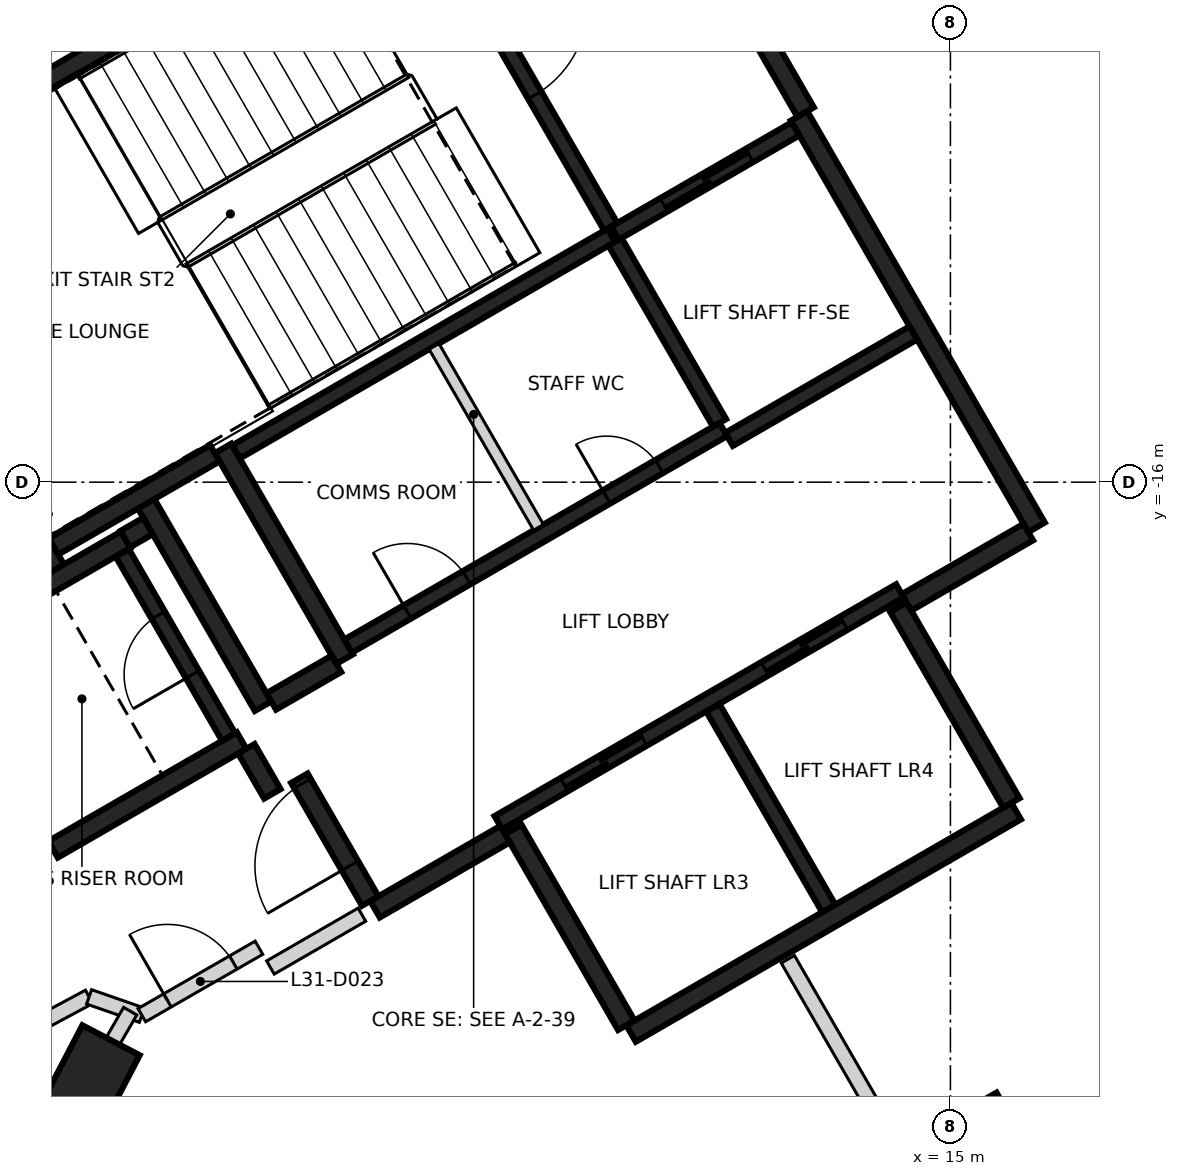
"""IFC4 building model, lengths in metres.
Left out: names, types, materials, properties, quantities, classifications, styles, units other than length and angle.
Written with IfcOpenShell. Run it as: python <this file> out.ifc"""

import sys

from ifc_helpers import new_model, si_unit, direction, frame, frame_2d, origin, origin_2d, place, context, subcontext, project, spatial, rectangle, extrude, element, fill, save


model = new_model("IFC4")
c1 = context("Model", 3, precision=1e-05, world=origin(), true_north=direction((0.0, 1.0)))
c2 = subcontext(c1, "Body", "Model", "MODEL_VIEW")
j1 = project(units=[si_unit("LENGTHUNIT", "METRE"), si_unit("PLANEANGLEUNIT", "RADIAN")], contexts=[c1])
p1 = place(None, origin())
s1 = spatial("IfcSite", under=j1, at=p1, CompositionType="ELEMENT")
p2 = place(p1, origin())
s2 = spatial("IfcBuilding", under=s1, at=p2, CompositionType="ELEMENT")
p3 = place(p2, frame((0.0, 0.0, 128.8)))
s3 = spatial("IfcBuildingStorey", under=s2, at=p3, CompositionType="ELEMENT", Elevation=128.8)
p4 = place(p3, frame((3.667, -23.896, -0.4), z_axis=(0.0, 0.0, 1.0), x_axis=(0.463006774365, 0.886354740999, 0.0)))
e1 = element("IfcColumn", 1, at=p4, inside=s3, PredefinedType="COLUMN", context=c2, shape_type="SweptSolid", body=[
    extrude(rectangle(XDim=1.25, YDim=0.85, at=origin_2d()), origin(), (0.0, 0.0, 1.0), 3.6),
])
p5 = place(p3, frame((15.207, -26.34, -0.4), z_axis=(0.0, 0.0, 1.0), x_axis=(-0.5, 0.866025403784, 0.0)))
e2 = element("IfcColumn", 2, at=p5, inside=s3, PredefinedType="COLUMN", context=c2, shape_type="SweptSolid", body=[
    extrude(rectangle(XDim=3.6, YDim=3.0, at=origin_2d()), origin(), (0.0, 0.0, 1.0), 3.6),
])
p6 = place(p3, frame((0.417, -12.273, 0.0), z_axis=(0.0, 0.0, 1.0), x_axis=(0.866021906294, 0.500006057782, 0.0)))
e3 = element("IfcWall", 3, at=p6, inside=s3, PredefinedType="SHEAR", context=c2, shape_type="SweptSolid", body=[
    extrude(rectangle(XDim=11.55, YDim=0.25, at=frame_2d((5.775, 0.0))), origin(), (0.0, 0.0, 1.0), 3.2),
])
p7 = place(p6, frame((10.025, 0.0, 0.0)))
e4 = element("IfcOpeningElement", 4, at=p7, cuts=e3, PredefinedType="OPENING", context=c2, shape_type="SweptSolid", body=[
    extrude(rectangle(XDim=1.2, YDim=2.1, at=frame_2d((0.6, 1.05))), frame((0.0, 0.135, 0.0), z_axis=(0.0, -1.0, 0.0), x_axis=(1.0, 0.0, 0.0)), (0.0, 0.0, 1.0), 0.27),
])
p8 = place(p6, frame((8.725, 0.0, 0.0)))
e5 = element("IfcOpeningElement", 5, at=p8, cuts=e3, PredefinedType="OPENING", context=c2, shape_type="SweptSolid", body=[
    extrude(rectangle(XDim=1.2, YDim=2.1, at=frame_2d((0.6, 1.05))), frame((0.0, 0.135, 0.0), z_axis=(0.0, -1.0, 0.0), x_axis=(1.0, 0.0, 0.0)), (0.0, 0.0, 1.0), 0.27),
])
p9 = place(p3, frame((13.008, -11.181, 0.0), z_axis=(0.0, 0.0, 1.0), x_axis=(0.500004234368, -0.866022959057, 0.0)))
e6 = element("IfcWall", 6, at=p9, inside=s3, PredefinedType="SHEAR", context=c2, shape_type="SweptSolid", body=[
    extrude(rectangle(XDim=6.25, YDim=0.25, at=frame_2d((3.125, 0.0))), origin(), (0.0, 0.0, 1.0), 3.2),
])
p10 = place(p3, frame((15.865, -20.328, 0.0), z_axis=(0.0, 0.0, 1.0), x_axis=(-0.86602852612, -0.499994591916, 0.0)))
e7 = element("IfcWall", 7, at=p10, inside=s3, PredefinedType="SHEAR", context=c2, shape_type="SweptSolid", body=[
    extrude(rectangle(XDim=5.85, YDim=0.25, at=frame_2d((2.925, 0.0))), origin(), (0.0, 0.0, 1.0), 3.2),
])
p11 = place(p3, frame((3.235, -17.153, 0.0), z_axis=(0.0, 0.0, 1.0), x_axis=(-0.500008851346, 0.866020293397, 0.0)))
e8 = element("IfcWall", 8, at=p11, inside=s3, PredefinedType="SHEAR", context=c2, shape_type="SweptSolid", body=[
    extrude(rectangle(XDim=5.51, YDim=0.25, at=frame_2d((2.755, 0.0))), origin(), (0.0, 0.0, 1.0), 3.2),
])
p12 = place(p3, frame((10.483, -6.606, 0.0), z_axis=(0.0, 0.0, 1.0), x_axis=(0.49999885962, -0.866026062182, 0.0)))
e9 = element("IfcWall", 9, at=p12, inside=s3, PredefinedType="SHEAR", context=c2, shape_type="SweptSolid", body=[
    extrude(rectangle(XDim=5.225, YDim=0.25, at=frame_2d((2.612, 0.0))), origin(), (0.0, 0.0, 1.0), 3.2),
])
p13 = place(p3, frame((7.031, -18.327, 0.0), z_axis=(0.0, 0.0, 1.0), x_axis=(-0.499971222258, 0.866042017984, 0.0)))
e10 = element("IfcWall", 10, at=p13, inside=s3, PredefinedType="SHEAR", context=c2, shape_type="SweptSolid", body=[
    extrude(rectangle(XDim=3.2, YDim=0.25, at=frame_2d((1.6, 0.0))), origin(), (0.0, 0.0, 1.0), 3.2),
])
for number, where, z_axis, x_axis in (
    (11, (14.315, -17.644, 0.0), (0.0, 0.0, 1.0), (0.5, -0.866, 0.0)),
    (12, (10.736, -23.145, 0.0), (0.0, 0.0, 1.0), (-0.5, 0.866, 0.0)),
):
    element("IfcWall", number, at=place(p3, frame(where, z_axis=z_axis, x_axis=x_axis)), inside=s3, PredefinedType="SHEAR", context=c2, shape_type="SweptSolid", body=[
        extrude(rectangle(XDim=2.974, YDim=0.25, at=frame_2d((1.487, 0.0))), origin(), (0.0, 0.0, 1.0), 3.2),
    ])
p14 = place(p3, frame((3.085, -20.894, 0.0), z_axis=(0.0, 0.0, 1.0), x_axis=(-0.499978833458, 0.866037623948, 0.0)))
e13 = element("IfcWall", 13, at=p14, inside=s3, PredefinedType="SHEAR", context=c2, shape_type="SweptSolid", body=[
    extrude(rectangle(XDim=3.05, YDim=0.25, at=frame_2d((1.525, 0.0))), origin(), (0.0, 0.0, 1.0), 3.2),
])
p15 = place(p3, frame((1.669, -18.19, 0.0), z_axis=(0.0, 0.0, 1.0), x_axis=(0.866042235819, 0.499970844928, 0.0)))
e14 = element("IfcWall", 14, at=p15, inside=s3, PredefinedType="SHEAR", context=c2, shape_type="SweptSolid", body=[
    extrude(rectangle(XDim=2.865, YDim=0.25, at=frame_2d((1.432, 0.0))), origin(), (0.0, 0.0, 1.0), 3.2),
])
p16 = place(p3, frame((5.675, -19.399, 0.0), z_axis=(0.0, 0.0, 1.0), x_axis=(-0.866026637627, -0.499997862916, 0.0)))
e15 = element("IfcWall", 15, at=p16, inside=s3, PredefinedType="SHEAR", context=c2, shape_type="SweptSolid", body=[
    extrude(rectangle(XDim=2.865, YDim=0.25, at=frame_2d((1.432, 0.0))), origin(), (0.0, 0.0, 1.0), 3.2),
])
p17 = place(p3, frame((4.414, -16.276, 0.0), z_axis=(0.0, 0.0, 1.0), x_axis=(0.500003324108, -0.866023484601, 0.0)))
e16 = element("IfcWall", 16, at=p17, inside=s3, PredefinedType="SHEAR", context=c2, shape_type="SweptSolid", body=[
    extrude(rectangle(XDim=3.085, YDim=0.25, at=frame_2d((1.542, 0.0))), origin(), (0.0, 0.0, 1.0), 3.2),
])
p18 = place(p3, frame((5.322, -15.619, 0.0), z_axis=(0.0, 0.0, 1.0), x_axis=(-0.866026229868, -0.499998569178, 0.0)))
e17 = element("IfcWall", 17, at=p18, inside=s3, PredefinedType="SHEAR", context=c2, shape_type="SweptSolid", body=[
    extrude(rectangle(XDim=2.449, YDim=0.25, at=frame_2d((1.225, 0.0))), origin(), (0.0, 0.0, 1.0), 3.2),
])
p19 = place(p3, frame((9.14, -20.631, 0.0), z_axis=(0.0, 0.0, 1.0), x_axis=(-0.866043531843, -0.499968599967, 0.0)))
e18 = element("IfcWall", 18, at=p19, inside=s3, PredefinedType="SHEAR", context=c2, shape_type="SweptSolid", body=[
    extrude(rectangle(XDim=1.975, YDim=0.25, at=frame_2d((0.987, 0.0))), origin(), (0.0, 0.0, 1.0), 3.2),
])
p20 = place(p3, frame((16.025, -16.656, 0.0), z_axis=(0.0, 0.0, 1.0), x_axis=(-0.866016279763, -0.500015802937, 0.0)))
e19 = element("IfcWall", 19, at=p20, inside=s3, PredefinedType="SHEAR", context=c2, shape_type="SweptSolid", body=[
    extrude(rectangle(XDim=1.849, YDim=0.25, at=frame_2d((0.925, 0.0))), origin(), (0.0, 0.0, 1.0), 3.2),
])
p21 = place(p3, frame((7.367, -21.51, 0.0), z_axis=(0.0, 0.0, 1.0), x_axis=(-0.499983108224, 0.866035156036, 0.0)))
e20 = element("IfcWall", 20, at=p21, inside=s3, PredefinedType="SHEAR", context=c2, shape_type="SweptSolid", body=[
    extrude(rectangle(XDim=1.865, YDim=0.25, at=frame_2d((0.932, 0.0))), origin(), (0.0, 0.0, 1.0), 3.2),
])
p22 = place(p21, frame((0.535, 0.0, 0.0)))
e21 = element("IfcOpeningElement", 21, at=p22, cuts=e20, PredefinedType="OPENING", context=c2, shape_type="SweptSolid", body=[
    extrude(rectangle(XDim=1.25, YDim=2.1, at=frame_2d((0.625, 1.05))), frame((0.0, 0.135, 0.0), z_axis=(0.0, -1.0, 0.0), x_axis=(1.0, 0.0, 0.0)), (0.0, 0.0, 1.0), 0.27),
])
p23 = place(p3, frame((6.065, -18.885, 0.0), z_axis=(0.0, 0.0, 1.0), x_axis=(0.866017078145, 0.500014420154, 0.0)))
e22 = element("IfcWall", 22, at=p23, inside=s3, PredefinedType="SHEAR", context=c2, shape_type="SweptSolid", body=[
    extrude(rectangle(XDim=0.989, YDim=0.25, at=frame_2d((0.495, 0.0))), origin(), (0.0, 0.0, 1.0), 3.2),
])
p24 = place(p3, frame((6.08, -20.1, 0.0), z_axis=(0.0, 0.0, 1.0), x_axis=(-0.500051773299, 0.865995510393, 0.0)))
e23 = element("IfcWall", 23, at=p24, inside=s3, PredefinedType="SHEAR", context=c2, shape_type="SweptSolid", body=[
    extrude(rectangle(XDim=0.685, YDim=0.25, at=frame_2d((0.342, 0.0))), origin(), (0.0, 0.0, 1.0), 3.2),
])
p25 = place(p3, frame((4.145, -16.749, 0.0), z_axis=(0.0, 0.0, 1.0), x_axis=(0.866185586049, 0.49972245349, 0.0)))
e24 = element("IfcWall", 24, at=p25, inside=s3, PredefinedType="SHEAR", context=c2, shape_type="SweptSolid", body=[
    extrude(rectangle(XDim=0.344, YDim=0.25, at=frame_2d((0.172, 0.0))), origin(), (0.0, 0.0, 1.0), 3.2),
])
p26 = place(p3, frame((9.052, -20.48, 0.0), z_axis=(0.0, 0.0, 1.0), x_axis=(0.866030299012, 0.499991521122, 0.0)))
e25 = element("IfcWall", 25, at=p26, inside=s3, PredefinedType="SHEAR", context=c2, shape_type="SweptSolid", body=[
    extrude(rectangle(XDim=6.1, YDim=0.2, at=frame_2d((3.05, 0.0))), origin(), (0.0, 0.0, 1.0), 3.2),
])
p27 = place(p26, frame((1.0, 0.0, 0.0)))
e26 = element("IfcOpeningElement", 26, at=p27, cuts=e25, PredefinedType="OPENING", context=c2, shape_type="SweptSolid", body=[
    extrude(rectangle(XDim=1.2, YDim=2.1, at=frame_2d((0.6, 1.05))), frame((0.0, 0.11, 0.0), z_axis=(0.0, -1.0, 0.0), x_axis=(1.0, 0.0, 0.0)), (0.0, 0.0, 1.0), 0.22),
])
p28 = place(p26, frame((4.05, 0.0, 0.0)))
e27 = element("IfcOpeningElement", 27, at=p28, cuts=e25, PredefinedType="OPENING", context=c2, shape_type="SweptSolid", body=[
    extrude(rectangle(XDim=1.2, YDim=2.1, at=frame_2d((0.6, 1.05))), frame((0.0, 0.11, 0.0), z_axis=(0.0, -1.0, 0.0), x_axis=(1.0, 0.0, 0.0)), (0.0, 0.0, 1.0), 0.22),
])
p29 = place(p3, frame((10.538, -12.752, 0.0), z_axis=(0.0, 0.0, 1.0), x_axis=(-0.866038630372, -0.499977090179, 0.0)))
e28 = element("IfcWall", 28, at=p29, inside=s3, PredefinedType="SHEAR", context=c2, shape_type="SweptSolid", body=[
    extrude(rectangle(XDim=5.699, YDim=0.2, at=frame_2d((2.85, 0.0))), origin(), (0.0, 0.0, 1.0), 3.2),
])
p30 = place(p3, frame((7.077, -18.156, 0.0), z_axis=(0.0, 0.0, 1.0), x_axis=(0.866038630372, 0.499977090179, 0.0)))
e29 = element("IfcWall", 29, at=p30, inside=s3, PredefinedType="SHEAR", context=c2, shape_type="SweptSolid", body=[
    extrude(rectangle(XDim=5.699, YDim=0.2, at=frame_2d((2.85, 0.0))), origin(), (0.0, 0.0, 1.0), 3.2),
])
p31 = place(p30, frame((0.899, 0.0, 0.0)))
e30 = element("IfcOpeningElement", 30, at=p31, cuts=e29, PredefinedType="OPENING", context=c2, shape_type="SweptSolid", body=[
    extrude(rectangle(XDim=0.9, YDim=2.1, at=frame_2d((0.45, 1.05))), frame((0.0, 0.11, 0.0), z_axis=(0.0, -1.0, 0.0), x_axis=(1.0, 0.0, 0.0)), (0.0, 0.0, 1.0), 0.22),
])
p32 = place(p30, frame((3.924, 0.0, 0.0)))
e31 = element("IfcOpeningElement", 31, at=p32, cuts=e29, PredefinedType="OPENING", context=c2, shape_type="SweptSolid", body=[
    extrude(rectangle(XDim=0.8, YDim=2.1, at=frame_2d((0.4, 1.05))), frame((0.0, 0.11, 0.0), z_axis=(0.0, -1.0, 0.0), x_axis=(1.0, 0.0, 0.0)), (0.0, 0.0, 1.0), 0.22),
])
p33 = place(p3, frame((7.906, -8.094, 0.0), z_axis=(0.0, 0.0, 1.0), x_axis=(0.500024287448, -0.866011380966, 0.0)))
e32 = element("IfcWall", 32, at=p33, inside=s3, PredefinedType="SHEAR", context=c2, shape_type="SweptSolid", body=[
    extrude(rectangle(XDim=5.251, YDim=0.2, at=frame_2d((2.625, 0.0))), origin(), (0.0, 0.0, 1.0), 3.2),
])
p34 = place(p33, frame((1.849, 0.0, 0.0)))
e33 = element("IfcOpeningElement", 33, at=p34, cuts=e32, PredefinedType="OPENING", context=c2, shape_type="SweptSolid", body=[
    extrude(rectangle(XDim=1.4, YDim=2.1, at=frame_2d((0.7, 1.05))), frame((0.0, 0.11, 0.0), z_axis=(0.0, -1.0, 0.0), x_axis=(1.0, 0.0, 0.0)), (0.0, 0.0, 1.0), 0.22),
])
p35 = place(p3, frame((11.875, -18.967, 0.0), z_axis=(0.0, 0.0, 1.0), x_axis=(0.49998131003, -0.866036194175, 0.0)))
e34 = element("IfcWall", 34, at=p35, inside=s3, PredefinedType="SHEAR", context=c2, shape_type="SweptSolid", body=[
    extrude(rectangle(XDim=3.048, YDim=0.2, at=frame_2d((1.524, 0.0))), origin(), (0.0, 0.0, 1.0), 3.2),
])
p36 = place(p3, frame((5.503, -19.352, 0.0), z_axis=(0.0, 0.0, 1.0), x_axis=(-0.499986818241, 0.866033014143, 0.0)))
e35 = element("IfcWall", 35, at=p36, inside=s3, PredefinedType="SHEAR", context=c2, shape_type="SweptSolid", body=[
    extrude(rectangle(XDim=2.798, YDim=0.2, at=frame_2d((1.399, 0.0))), origin(), (0.0, 0.0, 1.0), 3.2),
])
p37 = place(p36, frame((0.949, 0.0, 0.0)))
e36 = element("IfcOpeningElement", 36, at=p37, cuts=e35, PredefinedType="OPENING", context=c2, shape_type="SweptSolid", body=[
    extrude(rectangle(XDim=0.9, YDim=2.1, at=frame_2d((0.45, 1.05))), frame((0.0, 0.11, 0.0), z_axis=(0.0, -1.0, 0.0), x_axis=(1.0, 0.0, 0.0)), (0.0, 0.0, 1.0), 0.22),
])
p38 = place(p3, frame((11.963, -15.22, 0.0), z_axis=(0.0, 0.0, 1.0), x_axis=(-0.500034990121, 0.866005201286, 0.0)))
e37 = element("IfcWall", 37, at=p38, inside=s3, PredefinedType="SHEAR", context=c2, shape_type="SweptSolid", body=[
    extrude(rectangle(XDim=2.75, YDim=0.2, at=frame_2d((1.375, 0.0))), origin(), (0.0, 0.0, 1.0), 3.2),
])
p39 = place(p3, frame((10.587, -12.723, 0.0), z_axis=(0.0, 0.0, 1.0), x_axis=(0.866037306777, 0.499979382845, 0.0)))
e38 = element("IfcWall", 38, at=p39, inside=s3, PredefinedType="SHEAR", context=c2, shape_type="SweptSolid", body=[
    extrude(rectangle(XDim=2.742, YDim=0.2, at=frame_2d((1.371, 0.0))), origin(), (0.0, 0.0, 1.0), 3.2),
])
p40 = place(p39, frame((0.743, 0.0, 0.0)))
e39 = element("IfcOpeningElement", 39, at=p40, cuts=e38, PredefinedType="OPENING", context=c2, shape_type="SweptSolid", body=[
    extrude(rectangle(XDim=1.3, YDim=2.1, at=frame_2d((0.65, 1.05))), frame((0.0, 0.11, 0.0), z_axis=(0.0, -1.0, 0.0), x_axis=(1.0, 0.0, 0.0)), (0.0, 0.0, 1.0), 0.22),
])
p41 = place(p3, frame((14.512, -14.037, 0.0), z_axis=(0.0, 0.0, 1.0), x_axis=(-0.866044696403, -0.499966582715, 0.0)))
e40 = element("IfcWall", 40, at=p41, inside=s3, PredefinedType="SHEAR", context=c2, shape_type="SweptSolid", body=[
    extrude(rectangle(XDim=2.799, YDim=0.2, at=frame_2d((1.399, 0.0))), origin(), (0.0, 0.0, 1.0), 3.2),
])
p42 = place(p3, frame((8.207, -14.214, 0.0), z_axis=(0.0, 0.0, 1.0), x_axis=(0.50002746344, -0.86600954718, 0.0)))
e41 = element("IfcWall", 41, at=p42, inside=s3, PredefinedType="PARTITIONING", context=c2, shape_type="SweptSolid", body=[
    extrude(rectangle(XDim=2.748, YDim=0.15, at=frame_2d((1.374, 0.0))), origin(), (0.0, 0.0, 1.0), 3.2),
])
p43 = place(p3, frame((2.73, -23.275, 0.0), z_axis=(0.0, 0.0, 1.0), x_axis=(0.880927165636, 0.473251866182, 0.0)))
e42 = element("IfcWall", 42, at=p43, inside=s3, PredefinedType="PARTITIONING", context=c2, shape_type="SweptSolid", body=[
    extrude(rectangle(XDim=1.065, YDim=0.2, at=frame_2d((0.532, 0.0))), origin(), (0.0, 0.0, 1.0), 3.2),
])
p44 = place(p3, frame((3.668, -22.771, 0.0), z_axis=(0.0, 0.0, 1.0), x_axis=(0.944447470761, -0.328662402738, 0.0)))
e43 = element("IfcWall", 43, at=p44, inside=s3, PredefinedType="PARTITIONING", context=c2, shape_type="SweptSolid", body=[
    extrude(rectangle(XDim=0.735, YDim=0.2, at=frame_2d((0.367, 0.0))), origin(), (0.0, 0.0, 1.0), 3.2),
])
p45 = place(p3, frame((4.362, -23.012, 0.0), z_axis=(0.0, 0.0, 1.0), x_axis=(0.866692617793, 0.49884256661, 0.0)))
e44 = element("IfcWall", 44, at=p45, inside=s3, PredefinedType="PARTITIONING", context=c2, shape_type="SweptSolid", body=[
    extrude(rectangle(XDim=1.778, YDim=0.2, at=frame_2d((0.889, 0.0))), origin(), (0.0, 0.0, 1.0), 3.2),
])
p46 = place(p45, frame((0.389, 0.0, 0.0)))
e45 = element("IfcOpeningElement", 45, at=p46, cuts=e44, PredefinedType="OPENING", context=c2, shape_type="SweptSolid", body=[
    extrude(rectangle(XDim=1.0, YDim=2.1, at=frame_2d((0.5, 1.05))), frame((0.0, 0.11, 0.0), z_axis=(0.0, -1.0, 0.0), x_axis=(1.0, 0.0, 0.0)), (0.0, 0.0, 1.0), 0.22),
])
p47 = place(p3, frame((6.054, -22.385, 0.0), z_axis=(0.0, 0.0, 1.0), x_axis=(0.86593101922, 0.500163443238, 0.0)))
e46 = element("IfcWall", 46, at=p47, inside=s3, PredefinedType="PARTITIONING", context=c2, shape_type="SweptSolid", body=[
    extrude(rectangle(XDim=1.39, YDim=0.2, at=frame_2d((0.695, 0.0))), origin(), (0.0, 0.0, 1.0), 3.2),
])
p48 = place(p3, frame((2.845, -25.321, 0.0), z_axis=(0.0, 0.0, 1.0), x_axis=(0.499942002849, 0.866058885866, 0.0)))
e47 = element("IfcWall", 47, at=p48, inside=s3, PredefinedType="PARTITIONING", context=c2, shape_type="SweptSolid", body=[
    extrude(rectangle(XDim=2.727, YDim=0.2, at=frame_2d((1.364, 0.0))), origin(), (0.0, 0.0, 1.0), 3.2),
])
p49 = place(p3, frame((12.861, -22.276, 0.0), z_axis=(0.0, 0.0, 1.0), x_axis=(0.49982784299, -0.866124775868, 0.0)))
e48 = element("IfcWall", 48, at=p49, inside=s3, PredefinedType="PARTITIONING", context=c2, shape_type="SweptSolid", body=[
    extrude(rectangle(XDim=2.741, YDim=0.2, at=frame_2d((1.37, 0.0))), origin(), (0.0, 0.0, 1.0), 3.2),
])
p50 = place(p40, origin())
e49 = element("IfcDoor", 49, at=p50, inside=s3, OperationType="SLIDING_TO_RIGHT", PredefinedType="DOOR", context=c2, shape_type="SweptSolid", body=[
    extrude(rectangle(XDim=1.3, YDim=2.1, at=frame_2d((0.65, 1.05))), frame((0.0, 0.025, 0.0), z_axis=(0.0, -1.0, 0.0), x_axis=(1.0, 0.0, 0.0)), (0.0, 0.0, 1.0), 0.05),
])
fill(e39, e49)
p51 = place(p27, origin())
e50 = element("IfcDoor", 50, at=p51, inside=s3, OperationType="DOUBLE_DOOR_SLIDING", PredefinedType="DOOR", context=c2, shape_type="SweptSolid", body=[
    extrude(rectangle(XDim=1.2, YDim=2.1, at=frame_2d((0.6, 1.05))), frame((0.0, 0.025, 0.0), z_axis=(0.0, -1.0, 0.0), x_axis=(1.0, 0.0, 0.0)), (0.0, 0.0, 1.0), 0.05),
])
fill(e26, e50)
p52 = place(p28, origin())
e51 = element("IfcDoor", 51, at=p52, inside=s3, OperationType="DOUBLE_DOOR_SLIDING", PredefinedType="DOOR", context=c2, shape_type="SweptSolid", body=[
    extrude(rectangle(XDim=1.2, YDim=2.1, at=frame_2d((0.6, 1.05))), frame((0.0, 0.025, 0.0), z_axis=(0.0, -1.0, 0.0), x_axis=(1.0, 0.0, 0.0)), (0.0, 0.0, 1.0), 0.05),
])
fill(e27, e51)
p53 = place(p22, origin())
e52 = element("IfcDoor", 52, at=p53, inside=s3, OperationType="SINGLE_SWING_LEFT", PredefinedType="DOOR", context=c2, shape_type="SweptSolid", body=[
    extrude(rectangle(XDim=1.25, YDim=2.1, at=frame_2d((0.625, 1.05))), frame((0.0, 0.025, 0.0), z_axis=(0.0, -1.0, 0.0), x_axis=(1.0, 0.0, 0.0)), (0.0, 0.0, 1.0), 0.05),
])
fill(e21, e52)
p54 = place(p34, origin())
e53 = element("IfcDoor", 53, at=p54, inside=s3, OperationType="SINGLE_SWING_RIGHT", PredefinedType="DOOR", context=c2, shape_type="SweptSolid", body=[
    extrude(rectangle(XDim=1.4, YDim=2.1, at=frame_2d((0.7, 1.05))), frame((0.0, 0.025, 0.0), z_axis=(0.0, -1.0, 0.0), x_axis=(1.0, 0.0, 0.0)), (0.0, 0.0, 1.0), 0.05),
])
fill(e33, e53)
p55 = place(p31, origin())
e54 = element("IfcDoor", 54, at=p55, inside=s3, OperationType="SINGLE_SWING_LEFT", PredefinedType="DOOR", context=c2, shape_type="SweptSolid", body=[
    extrude(rectangle(XDim=0.9, YDim=2.1, at=frame_2d((0.45, 1.05))), frame((0.0, 0.025, 0.0), z_axis=(0.0, -1.0, 0.0), x_axis=(1.0, 0.0, 0.0)), (0.0, 0.0, 1.0), 0.05),
])
fill(e30, e54)
p56 = place(p32, origin())
e55 = element("IfcDoor", 55, at=p56, inside=s3, OperationType="SINGLE_SWING_RIGHT", PredefinedType="DOOR", context=c2, shape_type="SweptSolid", body=[
    extrude(rectangle(XDim=0.8, YDim=2.1, at=frame_2d((0.4, 1.05))), frame((0.0, 0.025, 0.0), z_axis=(0.0, -1.0, 0.0), x_axis=(1.0, 0.0, 0.0)), (0.0, 0.0, 1.0), 0.05),
])
fill(e31, e55)
p57 = place(p37, origin())
e56 = element("IfcDoor", 56, at=p57, inside=s3, OperationType="SINGLE_SWING_LEFT", PredefinedType="DOOR", context=c2, shape_type="SweptSolid", body=[
    extrude(rectangle(XDim=0.9, YDim=2.1, at=frame_2d((0.45, 1.05))), frame((0.0, 0.025, 0.0), z_axis=(0.0, -1.0, 0.0), x_axis=(1.0, 0.0, 0.0)), (0.0, 0.0, 1.0), 0.05),
])
fill(e36, e56)
p58 = place(p46, frame((1.0, 0.0, 0.0), z_axis=(0.0, 0.0, 1.0), x_axis=(-1.0, 0.0, 0.0)))
e57 = element("IfcDoor", 57, at=p58, inside=s3, OperationType="SINGLE_SWING_LEFT", PredefinedType="DOOR", context=c2, shape_type="SweptSolid", body=[
    extrude(rectangle(XDim=1.0, YDim=2.1, at=frame_2d((0.5, 1.05))), frame((0.0, 0.025, 0.0), z_axis=(0.0, -1.0, 0.0), x_axis=(1.0, 0.0, 0.0)), (0.0, 0.0, 1.0), 0.05),
])
fill(e45, e57)
save(model, sys.argv[1])
